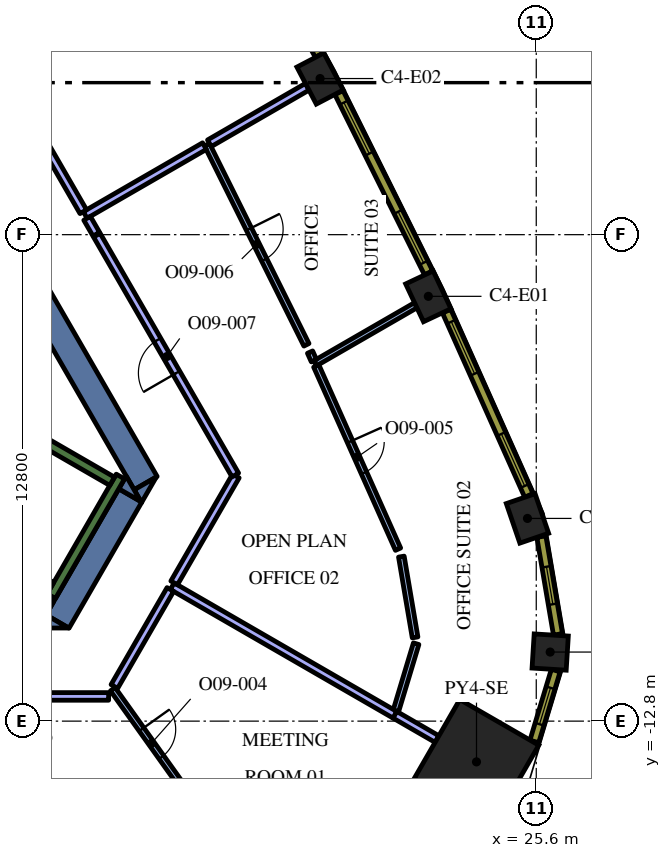
"""IFC4 building model, lengths in metres.
Left out: names, types, materials, properties, quantities, classifications, styles, units other than length and angle.
Written with IfcOpenShell. Run it as: python <this file> out.ifc"""

import sys

from ifc_helpers import new_model, si_unit, direction, frame, frame_2d, origin, origin_2d, place, context, subcontext, project, spatial, polyline, rectangle, outline, extrude, element, fill, save


model = new_model("IFC4")
c1 = context("Model", 3, precision=1e-05, world=origin(), true_north=direction((0.0, 1.0)))
c2 = subcontext(c1, "Body", "Model", "MODEL_VIEW")
j1 = project(units=[si_unit("LENGTHUNIT", "METRE"), si_unit("PLANEANGLEUNIT", "RADIAN")], contexts=[c1])
p1 = place(None, origin())
s1 = spatial("IfcSite", under=j1, at=p1, CompositionType="ELEMENT")
p2 = place(p1, origin())
s2 = spatial("IfcBuilding", under=s1, at=p2, CompositionType="ELEMENT")
p3 = place(p2, frame((0.0, 0.0, 239.4)))
s3 = spatial("IfcBuildingStorey", under=s2, at=p3, CompositionType="ELEMENT", Elevation=239.4)
p4 = place(p3, frame((24.027, -13.872, 0.0), z_axis=(0.0, 0.0, 1.0), x_axis=(0.866025403784, -0.5, 0.0)))
e1 = element("IfcColumn", 1, at=p4, inside=s3, PredefinedType="COLUMN", context=c2, shape_type="SweptSolid", body=[
    extrude(rectangle(XDim=2.4, YDim=2.4, at=origin_2d()), origin(), (0.0, 0.0, 1.0), 4.2),
])
p5 = place(p3, frame((25.967, -10.982, 0.0), z_axis=(0.0, 0.0, 1.0), x_axis=(0.062217428964, 0.998062619044, 0.0)))
e2 = element("IfcColumn", 2, at=p5, inside=s3, PredefinedType="COLUMN", context=c2, shape_type="SweptSolid", body=[
    extrude(rectangle(XDim=0.9, YDim=0.9, at=origin_2d()), origin(), (0.0, 0.0, 1.0), 4.2),
])
for number, where, z_axis, x_axis in (
    (3, (25.369, -7.466, 0.0), (0.0, 0.0, 1.0), (-0.324, 0.946, 0.0)),
    (4, (22.76, -1.623, 0.0), (0.0, 0.0, 1.0), (-0.426, 0.905, 0.0)),
    (5, (19.912, 4.108, 0.0), (0.0, 0.0, 1.0), (-0.464, 0.886, 0.0)),
):
    element("IfcColumn", number, at=place(p3, frame(where, z_axis=z_axis, x_axis=x_axis)), inside=s3, PredefinedType="COLUMN", context=c2, shape_type="SweptSolid", body=[
        extrude(rectangle(XDim=1.1, YDim=0.8, at=origin_2d()), origin(), (0.0, 0.0, 1.0), 4.2),
    ])
p6 = place(p3, frame((9.085, 4.264, 0.0), z_axis=(0.0, 0.0, 1.0), x_axis=(0.499998082512, -0.866026510844, 0.0)))
e6 = element("IfcWall", 6, at=p6, inside=s3, PredefinedType="SOLIDWALL", context=c2, shape_type="SweptSolid", body=[
    extrude(rectangle(XDim=12.472, YDim=0.7, at=frame_2d((6.236, 0.0))), origin(), (0.0, 0.0, 1.0), 4.2),
])
p7 = place(p3, origin())
e7 = element("IfcWall", 7, at=p7, inside=s3, PredefinedType="SOLIDWALL", context=c2, shape_type="SweptSolid", body=[
    extrude(outline(polyline([(15.213, -7.05), (15.019, -6.714), (15.601, -6.378), (15.213, -7.05)])), origin(), (0.0, 0.0, 1.0), 4.2),
])
p8 = place(p3, frame((13.003, -10.179, 0.0), z_axis=(0.0, 0.0, 1.0), x_axis=(0.499972675833, 0.866041178825, 0.0)))
e8 = element("IfcWall", 8, at=p8, inside=s3, PredefinedType="SOLIDWALL", context=c2, shape_type="SweptSolid", body=[
    extrude(rectangle(XDim=3.829, YDim=0.7, at=frame_2d((1.915, 0.0))), origin(), (0.0, 0.0, 1.0), 4.2),
])
e9 = element("IfcWall", 9, at=p7, inside=s3, PredefinedType="SOLIDWALL", context=c2, shape_type="SweptSolid", body=[
    extrude(outline(polyline([(12.5, -10.35), (12.698, -10.005), (13.296, -10.35), (12.5, -10.35)])), origin(), (0.0, 0.0, 1.0), 4.2),
])
e10 = element("IfcWall", 10, at=p7, inside=s3, PredefinedType="SOLIDWALL", context=c2, shape_type="SweptSolid", body=[
    extrude(outline(polyline([(14.809, -6.35), (15.197, -7.022), (14.615, -6.686), (14.809, -6.35)])), origin(), (0.0, 0.0, 1.0), 4.2),
])
e11 = element("IfcWall", 11, at=p7, inside=s3, PredefinedType="SOLIDWALL", context=c2, shape_type="SweptSolid", body=[
    extrude(outline(polyline([(12.904, -9.65), (12.516, -10.322), (12.516, -9.65), (12.904, -9.65)])), origin(), (0.0, 0.0, 1.0), 4.2),
])
p9 = place(p3, frame((12.84, -9.511, 0.0), z_axis=(0.0, 0.0, 1.0), x_axis=(0.500048121057, 0.865997619297, 0.0)))
e12 = element("IfcWall", 12, at=p9, inside=s3, PredefinedType="SOLIDWALL", context=c2, shape_type="SweptSolid", body=[
    extrude(rectangle(XDim=3.634, YDim=0.25, at=frame_2d((1.817, 0.0))), origin(), (0.0, 0.0, 1.0), 4.2),
])
p10 = place(p3, frame((12.84, -9.261, 0.0), z_axis=(0.0, 0.0, 1.0), x_axis=(-0.866013990052, 0.500019768644, 0.0)))
e13 = element("IfcWall", 13, at=p10, inside=s3, PredefinedType="SOLIDWALL", context=c2, shape_type="SweptSolid", body=[
    extrude(rectangle(XDim=6.8, YDim=0.25, at=frame_2d((3.4, 0.0))), origin(), (0.0, 0.0, 1.0), 4.2),
])
p11 = place(p3, frame((8.334, -2.964, 0.0), z_axis=(0.0, 0.0, 1.0), x_axis=(0.866016039709, -0.500016218704, 0.0)))
e14 = element("IfcWall", 14, at=p11, inside=s3, PredefinedType="SOLIDWALL", context=c2, shape_type="SweptSolid", body=[
    extrude(rectangle(XDim=7.05, YDim=0.25, at=frame_2d((3.525, 0.0))), origin(), (0.0, 0.0, 1.0), 4.2),
])
p12 = place(p3, frame((14.457, -11.96, 0.0), z_axis=(0.0, 0.0, 1.0), x_axis=(0.581049944662, -0.81386790194, 0.0)))
e15 = element("IfcWall", 15, at=p12, inside=s3, PredefinedType="PARTITIONING", context=c2, shape_type="SweptSolid", body=[
    extrude(rectangle(XDim=3.926, YDim=0.15, at=frame_2d((1.963, 0.0))), origin(), (0.0, 0.0, 1.0), 3.45),
])
p13 = place(p12, frame((1.3, 0.0, 0.0)))
e16 = element("IfcOpeningElement", 16, at=p13, cuts=e15, PredefinedType="OPENING", context=c2, shape_type="SweptSolid", body=[
    extrude(rectangle(XDim=0.9, YDim=2.1, at=frame_2d((0.45, 1.05))), frame((0.0, 0.085, 0.0), z_axis=(0.0, -1.0, 0.0), x_axis=(1.0, 0.0, 0.0)), (0.0, 0.0, 1.0), 0.17),
])
p14 = place(p3, frame((9.72, -12.15, 0.0), z_axis=(0.0, 0.0, 1.0), x_axis=(1.0, 0.0, 0.0)))
e17 = element("IfcWall", 17, at=p14, inside=s3, PredefinedType="PARTITIONING", context=c2, shape_type="SweptSolid", body=[
    extrude(rectangle(XDim=4.627, YDim=0.2, at=frame_2d((2.314, 0.0))), origin(), (0.0, 0.0, 1.0), 3.45),
])
p15 = place(p14, frame((1.8, 0.0, 0.0)))
e18 = element("IfcOpeningElement", 18, at=p15, cuts=e17, PredefinedType="OPENING", context=c2, shape_type="SweptSolid", body=[
    extrude(rectangle(XDim=1.0, YDim=2.1, at=frame_2d((0.5, 1.05))), frame((0.0, 0.11, 0.0), z_axis=(0.0, -1.0, 0.0), x_axis=(1.0, 0.0, 0.0)), (0.0, 0.0, 1.0), 0.22),
])
p16 = place(p3, frame((21.873, -12.628, 0.0), z_axis=(0.0, 0.0, 1.0), x_axis=(0.866052988967, -0.499952218018, 0.0)))
e19 = element("IfcWall", 19, at=p16, inside=s3, PredefinedType="PARTITIONING", context=c2, shape_type="SweptSolid", body=[
    extrude(rectangle(XDim=1.288, YDim=0.2, at=frame_2d((0.644, 0.0))), origin(), (0.0, 0.0, 1.0), 3.45),
])
p17 = place(p3, frame((16.021, -9.25, 0.0), z_axis=(0.0, 0.0, 1.0), x_axis=(0.86602692059, -0.499997372806, 0.0)))
e20 = element("IfcWall", 20, at=p17, inside=s3, PredefinedType="PARTITIONING", context=c2, shape_type="SweptSolid", body=[
    extrude(rectangle(XDim=6.765, YDim=0.2, at=frame_2d((3.382, 0.0))), origin(), (0.0, 0.0, 1.0), 3.45),
])
p18 = place(p3, frame((14.498, -11.888, 0.0), z_axis=(0.0, 0.0, 1.0), x_axis=(0.500006981563, 0.86602137294, 0.0)))
e21 = element("IfcWall", 21, at=p18, inside=s3, PredefinedType="PARTITIONING", context=c2, shape_type="SweptSolid", body=[
    extrude(rectangle(XDim=2.946, YDim=0.2, at=frame_2d((1.473, 0.0))), origin(), (0.0, 0.0, 1.0), 3.45),
])
p19 = place(p3, frame((19.78, -3.386, 0.0), z_axis=(0.0, 0.0, 1.0), x_axis=(0.866063280451, 0.49993438995, 0.0)))
e22 = element("IfcWall", 22, at=p19, inside=s3, PredefinedType="PARTITIONING", context=c2, shape_type="SweptSolid", body=[
    extrude(rectangle(XDim=3.058, YDim=0.15, at=frame_2d((1.529, 0.0))), origin(), (0.0, 0.0, 1.0), 3.45),
])
p20 = place(p3, frame((21.906, -12.532, 0.0), z_axis=(0.0, 0.0, 1.0), x_axis=(0.288789848591, 0.957392512688, 0.0)))
e23 = element("IfcWall", 23, at=p20, inside=s3, PredefinedType="PARTITIONING", context=c2, shape_type="SweptSolid", body=[
    extrude(rectangle(XDim=1.848, YDim=0.15, at=frame_2d((0.924, 0.0))), origin(), (0.0, 0.0, 1.0), 3.45),
])
p21 = place(p3, frame((22.412, -10.597, 0.0), z_axis=(0.0, 0.0, 1.0), x_axis=(-0.167612004459, 0.985853039738, 0.0)))
e24 = element("IfcWall", 24, at=p21, inside=s3, PredefinedType="PARTITIONING", context=c2, shape_type="SweptSolid", body=[
    extrude(rectangle(XDim=2.156, YDim=0.15, at=frame_2d((1.078, 0.0))), origin(), (0.0, 0.0, 1.0), 3.45),
])
p22 = place(p3, frame((19.811, -3.455, 0.0), z_axis=(0.0, 0.0, 1.0), x_axis=(0.407605393886, -0.913158169692, 0.0)))
e25 = element("IfcWall", 25, at=p22, inside=s3, PredefinedType="PARTITIONING", context=c2, shape_type="SweptSolid", body=[
    extrude(rectangle(XDim=5.279, YDim=0.15, at=frame_2d((2.64, 0.0))), origin(), (0.0, 0.0, 1.0), 3.45),
])
p23 = place(p22, frame((2.179, 0.0, 0.0)))
e26 = element("IfcOpeningElement", 26, at=p23, cuts=e25, PredefinedType="OPENING", context=c2, shape_type="SweptSolid", body=[
    extrude(rectangle(XDim=0.9, YDim=2.1, at=frame_2d((0.45, 1.05))), frame((0.0, 0.085, 0.0), z_axis=(0.0, -1.0, 0.0), x_axis=(1.0, 0.0, 0.0)), (0.0, 0.0, 1.0), 0.17),
])
p24 = place(p3, frame((19.75, -3.317, 0.0), z_axis=(0.0, 0.0, 1.0), x_axis=(-0.406774979688, 0.913528388119, 0.0)))
e27 = element("IfcWall", 27, at=p24, inside=s3, PredefinedType="PARTITIONING", context=c2, shape_type="SweptSolid", body=[
    extrude(rectangle(XDim=0.249, YDim=0.15, at=frame_2d((0.125, 0.0))), origin(), (0.0, 0.0, 1.0), 3.45),
])
p25 = place(p3, frame((16.935, 2.368, 0.0), z_axis=(0.0, 0.0, 1.0), x_axis=(0.445153322039, -0.895454365045, 0.0)))
e28 = element("IfcWall", 28, at=p25, inside=s3, PredefinedType="PARTITIONING", context=c2, shape_type="SweptSolid", body=[
    extrude(rectangle(XDim=5.881, YDim=0.15, at=frame_2d((2.94, 0.0))), origin(), (0.0, 0.0, 1.0), 3.45),
])
p26 = place(p25, frame((2.481, 0.0, 0.0)))
e29 = element("IfcOpeningElement", 29, at=p26, cuts=e28, PredefinedType="OPENING", context=c2, shape_type="SweptSolid", body=[
    extrude(rectangle(XDim=0.9, YDim=2.1, at=frame_2d((0.45, 1.05))), frame((0.0, 0.085, 0.0), z_axis=(0.0, -1.0, 0.0), x_axis=(1.0, 0.0, 0.0)), (0.0, 0.0, 1.0), 0.17),
])
p27 = place(p3, frame((17.0, 2.406, 0.0), z_axis=(0.0, 0.0, 1.0), x_axis=(0.86605561342, 0.499947671726, 0.0)))
e30 = element("IfcWall", 30, at=p27, inside=s3, PredefinedType="PARTITIONING", context=c2, shape_type="SweptSolid", body=[
    extrude(rectangle(XDim=2.971, YDim=0.2, at=frame_2d((1.486, 0.0))), origin(), (0.0, 0.0, 1.0), 3.45),
])
p28 = place(p3, frame((13.731, 0.518, 0.0), z_axis=(0.0, 0.0, 1.0), x_axis=(0.8660128559, 0.500021732944, 0.0)))
e31 = element("IfcWall", 31, at=p28, inside=s3, PredefinedType="PARTITIONING", context=c2, shape_type="SweptSolid", body=[
    extrude(rectangle(XDim=3.625, YDim=0.2, at=frame_2d((1.812, 0.0))), origin(), (0.0, 0.0, 1.0), 3.45),
])
p29 = place(p3, frame((14.022, 0.013, 0.0), z_axis=(0.0, 0.0, 1.0), x_axis=(-0.500159754115, 0.865933150054, 0.0)))
e32 = element("IfcWall", 32, at=p29, inside=s3, PredefinedType="PARTITIONING", context=c2, shape_type="SweptSolid", body=[
    extrude(rectangle(XDim=0.483, YDim=0.2, at=frame_2d((0.242, 0.0))), origin(), (0.0, 0.0, 1.0), 3.45),
])
p30 = place(p3, frame((16.072, -9.163, 0.0), z_axis=(0.0, 0.0, 1.0), x_axis=(0.500010870188, 0.866019127788, 0.0)))
e33 = element("IfcWall", 33, at=p30, inside=s3, PredefinedType="PARTITIONING", context=c2, shape_type="SweptSolid", body=[
    extrude(rectangle(XDim=3.249, YDim=0.2, at=frame_2d((1.624, 0.0))), origin(), (0.0, 0.0, 1.0), 3.45),
])
p31 = place(p3, frame((17.681, -6.324, 0.0), z_axis=(0.0, 0.0, 1.0), x_axis=(-0.50002695829, 0.866009838849, 0.0)))
e34 = element("IfcWall", 34, at=p31, inside=s3, PredefinedType="PARTITIONING", context=c2, shape_type="SweptSolid", body=[
    extrude(rectangle(XDim=7.287, YDim=0.2, at=frame_2d((3.644, 0.0))), origin(), (0.0, 0.0, 1.0), 3.45),
])
p32 = place(p31, frame((3.1, 0.0, 0.0)))
e35 = element("IfcOpeningElement", 35, at=p32, cuts=e34, PredefinedType="OPENING", context=c2, shape_type="SweptSolid", body=[
    extrude(rectangle(XDim=1.0, YDim=2.1, at=frame_2d((0.5, 1.05))), frame((0.0, 0.11, 0.0), z_axis=(0.0, -1.0, 0.0), x_axis=(1.0, 0.0, 0.0)), (0.0, 0.0, 1.0), 0.22),
])
p33 = place(p3, frame((13.681, 0.604, 0.0), z_axis=(0.0, 0.0, 1.0), x_axis=(-0.500001759768, 0.86602438778, 0.0)))
e36 = element("IfcWall", 36, at=p33, inside=s3, PredefinedType="PARTITIONING", context=c2, shape_type="SweptSolid", body=[
    extrude(rectangle(XDim=13.317, YDim=0.2, at=frame_2d((6.658, 0.0))), origin(), (0.0, 0.0, 1.0), 3.45),
])
p34 = place(p33, frame((6.2, 0.0, 0.0)))
e37 = element("IfcOpeningElement", 37, at=p34, cuts=e36, PredefinedType="OPENING", context=c2, shape_type="SweptSolid", body=[
    extrude(rectangle(XDim=1.0, YDim=2.1, at=frame_2d((0.5, 1.05))), frame((0.0, 0.11, 0.0), z_axis=(0.0, -1.0, 0.0), x_axis=(1.0, 0.0, 0.0)), (0.0, 0.0, 1.0), 0.22),
])
p35 = place(p3, frame((25.55, -13.335, 0.0), z_axis=(0.0, 0.0, 1.0), x_axis=(0.288727209095, 0.957411405159, 0.0)))
e38 = element("IfcWall", 38, at=p35, inside=s3, PredefinedType="SOLIDWALL", context=c2, shape_type="SweptSolid", body=[
    extrude(rectangle(XDim=1.948, YDim=0.24, at=frame_2d((0.974, 0.0))), origin(), (0.0, 0.0, 1.0), 3.95),
])
p36 = place(p35, frame((0.474, 0.0, 0.9)))
e39 = element("IfcOpeningElement", 39, at=p36, cuts=e38, PredefinedType="OPENING", context=c2, shape_type="SweptSolid", body=[
    extrude(rectangle(XDim=1.0, YDim=2.55, at=frame_2d((0.5, 1.275))), frame((0.0, 0.13, 0.0), z_axis=(0.0, -1.0, 0.0), x_axis=(1.0, 0.0, 0.0)), (0.0, 0.0, 1.0), 0.26),
])
p37 = place(p3, frame((26.172, -10.517, 0.0), z_axis=(0.0, 0.0, 1.0), x_axis=(-0.167660055546, 0.985844869021, 0.0)))
e40 = element("IfcWall", 40, at=p37, inside=s3, PredefinedType="SOLIDWALL", context=c2, shape_type="SweptSolid", body=[
    extrude(rectangle(XDim=2.609, YDim=0.24, at=frame_2d((1.305, 0.0))), origin(), (0.0, 0.0, 1.0), 3.95),
])
p38 = place(p37, frame((0.805, 0.0, 0.9)))
e41 = element("IfcOpeningElement", 41, at=p38, cuts=e40, PredefinedType="OPENING", context=c2, shape_type="SweptSolid", body=[
    extrude(rectangle(XDim=1.0, YDim=2.55, at=frame_2d((0.5, 1.275))), frame((0.0, 0.13, 0.0), z_axis=(0.0, -1.0, 0.0), x_axis=(1.0, 0.0, 0.0)), (0.0, 0.0, 1.0), 0.26),
])
p39 = place(p3, frame((25.405, -6.861, 0.0), z_axis=(0.0, 0.0, 1.0), x_axis=(-0.407579651789, 0.913169659728, 0.0)))
e42 = element("IfcWall", 42, at=p39, inside=s3, PredefinedType="SOLIDWALL", context=c2, shape_type="SweptSolid", body=[
    extrude(rectangle(XDim=5.311, YDim=0.24, at=frame_2d((2.655, 0.0))), origin(), (0.0, 0.0, 1.0), 3.95),
])
p40 = place(p39, frame((0.271, 0.0, 0.9)))
e43 = element("IfcOpeningElement", 43, at=p40, cuts=e42, PredefinedType="OPENING", context=c2, shape_type="SweptSolid", body=[
    extrude(rectangle(XDim=1.5, YDim=2.55, at=frame_2d((0.75, 1.275))), frame((0.0, 0.13, 0.0), z_axis=(0.0, -1.0, 0.0), x_axis=(1.0, 0.0, 0.0)), (0.0, 0.0, 1.0), 0.26),
])
p41 = place(p39, frame((3.504, 0.0, 0.9)))
e44 = element("IfcOpeningElement", 44, at=p41, cuts=e42, PredefinedType="OPENING", context=c2, shape_type="SweptSolid", body=[
    extrude(rectangle(XDim=1.5, YDim=2.55, at=frame_2d((0.75, 1.275))), frame((0.0, 0.13, 0.0), z_axis=(0.0, -1.0, 0.0), x_axis=(1.0, 0.0, 0.0)), (0.0, 0.0, 1.0), 0.26),
])
p42 = place(p3, frame((22.766, -1.005, 0.0), z_axis=(0.0, 0.0, 1.0), x_axis=(-0.445129582031, 0.895466166419, 0.0)))
e45 = element("IfcWall", 45, at=p42, inside=s3, PredefinedType="SOLIDWALL", context=c2, shape_type="SweptSolid", body=[
    extrude(rectangle(XDim=5.298, YDim=0.24, at=frame_2d((2.649, 0.0))), origin(), (0.0, 0.0, 1.0), 3.95),
])
p43 = place(p42, frame((0.295, 0.0, 0.9)))
e46 = element("IfcOpeningElement", 46, at=p43, cuts=e45, PredefinedType="OPENING", context=c2, shape_type="SweptSolid", body=[
    extrude(rectangle(XDim=1.5, YDim=2.55, at=frame_2d((0.75, 1.275))), frame((0.0, 0.13, 0.0), z_axis=(0.0, -1.0, 0.0), x_axis=(1.0, 0.0, 0.0)), (0.0, 0.0, 1.0), 0.26),
])
p44 = place(p42, frame((3.504, 0.0, 0.9)))
e47 = element("IfcOpeningElement", 47, at=p44, cuts=e45, PredefinedType="OPENING", context=c2, shape_type="SweptSolid", body=[
    extrude(rectangle(XDim=1.5, YDim=2.55, at=frame_2d((0.75, 1.275))), frame((0.0, 0.13, 0.0), z_axis=(0.0, -1.0, 0.0), x_axis=(1.0, 0.0, 0.0)), (0.0, 0.0, 1.0), 0.26),
])
p45 = place(p3, frame((19.892, 4.725, 0.0), z_axis=(0.0, 0.0, 1.0), x_axis=(-0.481925825015, 0.876212017256, 0.0)))
e48 = element("IfcWall", 48, at=p45, inside=s3, PredefinedType="SOLIDWALL", context=c2, shape_type="SweptSolid", body=[
    extrude(rectangle(XDim=5.299, YDim=0.24, at=frame_2d((2.649, 0.0))), origin(), (0.0, 0.0, 1.0), 3.95),
])
p46 = place(p45, frame((0.295, 0.0, 0.9)))
e49 = element("IfcOpeningElement", 49, at=p46, cuts=e48, PredefinedType="OPENING", context=c2, shape_type="SweptSolid", body=[
    extrude(rectangle(XDim=1.5, YDim=2.55, at=frame_2d((0.75, 1.275))), frame((0.0, 0.13, 0.0), z_axis=(0.0, -1.0, 0.0), x_axis=(1.0, 0.0, 0.0)), (0.0, 0.0, 1.0), 0.26),
])
p47 = place(p45, frame((3.504, 0.0, 0.9)))
e50 = element("IfcOpeningElement", 50, at=p47, cuts=e48, PredefinedType="OPENING", context=c2, shape_type="SweptSolid", body=[
    extrude(rectangle(XDim=1.5, YDim=2.55, at=frame_2d((0.75, 1.275))), frame((0.0, 0.13, 0.0), z_axis=(0.0, -1.0, 0.0), x_axis=(1.0, 0.0, 0.0)), (0.0, 0.0, 1.0), 0.26),
])
p48 = place(p13, origin())
e51 = element("IfcDoor", 51, at=p48, inside=s3, OperationType="SINGLE_SWING_LEFT", PredefinedType="DOOR", context=c2, shape_type="SweptSolid", body=[
    extrude(rectangle(XDim=0.9, YDim=2.1, at=frame_2d((0.45, 1.05))), frame((0.0, 0.025, 0.0), z_axis=(0.0, -1.0, 0.0), x_axis=(1.0, 0.0, 0.0)), (0.0, 0.0, 1.0), 0.05),
])
fill(e16, e51)
p49 = place(p23, origin())
e52 = element("IfcDoor", 52, at=p49, inside=s3, OperationType="SINGLE_SWING_LEFT", PredefinedType="DOOR", context=c2, shape_type="SweptSolid", body=[
    extrude(rectangle(XDim=0.9, YDim=2.1, at=frame_2d((0.45, 1.05))), frame((0.0, 0.025, 0.0), z_axis=(0.0, -1.0, 0.0), x_axis=(1.0, 0.0, 0.0)), (0.0, 0.0, 1.0), 0.05),
])
fill(e26, e52)
p50 = place(p26, origin())
e53 = element("IfcDoor", 53, at=p50, inside=s3, OperationType="SINGLE_SWING_LEFT", PredefinedType="DOOR", context=c2, shape_type="SweptSolid", body=[
    extrude(rectangle(XDim=0.9, YDim=2.1, at=frame_2d((0.45, 1.05))), frame((0.0, 0.025, 0.0), z_axis=(0.0, -1.0, 0.0), x_axis=(1.0, 0.0, 0.0)), (0.0, 0.0, 1.0), 0.05),
])
fill(e29, e53)
p51 = place(p32, origin())
e54 = element("IfcDoor", 54, at=p51, inside=s3, OperationType="SINGLE_SWING_LEFT", PredefinedType="DOOR", context=c2, shape_type="SweptSolid", body=[
    extrude(rectangle(XDim=1.0, YDim=2.1, at=frame_2d((0.5, 1.05))), frame((0.0, 0.025, 0.0), z_axis=(0.0, -1.0, 0.0), x_axis=(1.0, 0.0, 0.0)), (0.0, 0.0, 1.0), 0.05),
])
fill(e35, e54)
p52 = place(p36, origin())
e55 = element("IfcWindow", 55, at=p52, inside=s3, PartitioningType="SINGLE_PANEL", PredefinedType="WINDOW", context=c2, shape_type="SweptSolid", body=[
    extrude(rectangle(XDim=1.0, YDim=2.55, at=frame_2d((0.5, 1.275))), frame((0.0, 0.04, 0.0), z_axis=(0.0, -1.0, 0.0), x_axis=(1.0, 0.0, 0.0)), (0.0, 0.0, 1.0), 0.06),
])
fill(e39, e55)
p53 = place(p38, origin())
e56 = element("IfcWindow", 56, at=p53, inside=s3, PartitioningType="SINGLE_PANEL", PredefinedType="WINDOW", context=c2, shape_type="SweptSolid", body=[
    extrude(rectangle(XDim=1.0, YDim=2.55, at=frame_2d((0.5, 1.275))), frame((0.0, 0.04, 0.0), z_axis=(0.0, -1.0, 0.0), x_axis=(1.0, 0.0, 0.0)), (0.0, 0.0, 1.0), 0.06),
])
fill(e41, e56)
p54 = place(p40, origin())
e57 = element("IfcWindow", 57, at=p54, inside=s3, PartitioningType="SINGLE_PANEL", PredefinedType="WINDOW", context=c2, shape_type="SweptSolid", body=[
    extrude(rectangle(XDim=1.5, YDim=2.55, at=frame_2d((0.75, 1.275))), frame((0.0, 0.04, 0.0), z_axis=(0.0, -1.0, 0.0), x_axis=(1.0, 0.0, 0.0)), (0.0, 0.0, 1.0), 0.06),
])
fill(e43, e57)
p55 = place(p41, origin())
e58 = element("IfcWindow", 58, at=p55, inside=s3, PartitioningType="SINGLE_PANEL", PredefinedType="WINDOW", context=c2, shape_type="SweptSolid", body=[
    extrude(rectangle(XDim=1.5, YDim=2.55, at=frame_2d((0.75, 1.275))), frame((0.0, 0.04, 0.0), z_axis=(0.0, -1.0, 0.0), x_axis=(1.0, 0.0, 0.0)), (0.0, 0.0, 1.0), 0.06),
])
fill(e44, e58)
p56 = place(p43, origin())
e59 = element("IfcWindow", 59, at=p56, inside=s3, PartitioningType="SINGLE_PANEL", PredefinedType="WINDOW", context=c2, shape_type="SweptSolid", body=[
    extrude(rectangle(XDim=1.5, YDim=2.55, at=frame_2d((0.75, 1.275))), frame((0.0, 0.04, 0.0), z_axis=(0.0, -1.0, 0.0), x_axis=(1.0, 0.0, 0.0)), (0.0, 0.0, 1.0), 0.06),
])
fill(e46, e59)
p57 = place(p44, origin())
e60 = element("IfcWindow", 60, at=p57, inside=s3, PartitioningType="SINGLE_PANEL", PredefinedType="WINDOW", context=c2, shape_type="SweptSolid", body=[
    extrude(rectangle(XDim=1.5, YDim=2.55, at=frame_2d((0.75, 1.275))), frame((0.0, 0.04, 0.0), z_axis=(0.0, -1.0, 0.0), x_axis=(1.0, 0.0, 0.0)), (0.0, 0.0, 1.0), 0.06),
])
fill(e47, e60)
save(model, sys.argv[1])
